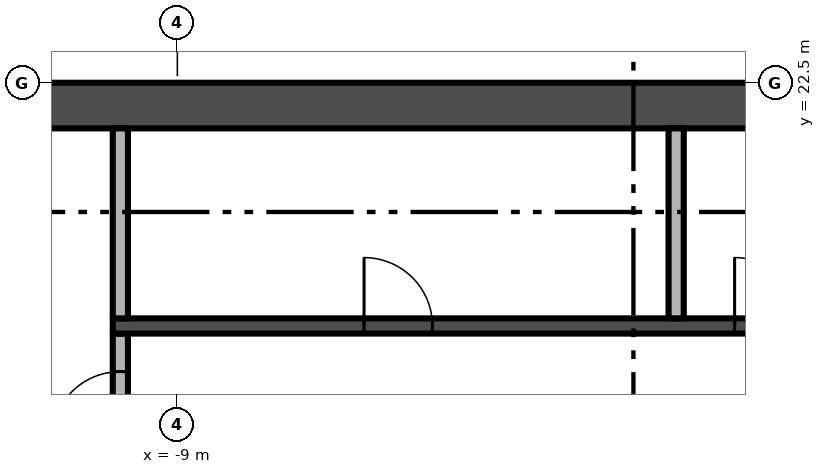
"""IFC4 building model, lengths in metres.
Left out: names, types, materials, properties, quantities, classifications, styles, units other than length and angle.
Written with IfcOpenShell. Run it as: python <this file> out.ifc"""

import sys

from ifc_helpers import new_model, si_unit, direction, frame, frame_2d, origin, place, context, subcontext, project, spatial, rectangle, extrude, element, fill, save


model = new_model("IFC4")
c1 = context("Model", 3, precision=1e-05, world=origin(), true_north=direction((0.0, 1.0)))
c2 = subcontext(c1, "Body", "Model", "MODEL_VIEW")
j1 = project(units=[si_unit("LENGTHUNIT", "METRE"), si_unit("PLANEANGLEUNIT", "RADIAN")], contexts=[c1])
p1 = place(None, origin())
s1 = spatial("IfcSite", under=j1, at=p1, CompositionType="ELEMENT")
p2 = place(p1, origin())
s2 = spatial("IfcBuilding", under=s1, at=p2, CompositionType="ELEMENT")
p3 = place(p2, frame((0.0, 0.0, 284.4)))
s3 = spatial("IfcBuildingStorey", under=s2, at=p3, CompositionType="ELEMENT", Elevation=284.4)
p4 = place(p3, frame((13.5, 22.2, -0.3), z_axis=(0.0, 0.0, 1.0), x_axis=(-1.0, 0.0, 0.0)))
e1 = element("IfcWall", 1, at=p4, inside=s3, PredefinedType="SHEAR", context=c2, shape_type="SweptSolid", body=[
    extrude(rectangle(XDim=27.0, YDim=0.6, at=frame_2d((13.5, 0.0))), origin(), (0.0, 0.0, 1.0), 5.0),
])
p5 = place(p3, frame((-9.75, 17.8, 0.0), z_axis=(0.0, 0.0, 1.0), x_axis=(0.0, 1.0, 0.0)))
e2 = element("IfcWall", 2, at=p5, inside=s3, PredefinedType="PARTITIONING", context=c2, shape_type="SweptSolid", body=[
    extrude(rectangle(XDim=1.4, YDim=0.2, at=frame_2d((0.7, 0.0))), origin(), (0.0, 0.0, 1.0), 4.7),
])
p6 = place(p5, origin())
e3 = element("IfcOpeningElement", 3, at=p6, cuts=e2, PredefinedType="OPENING", context=c2, shape_type="SweptSolid", body=[
    extrude(rectangle(XDim=0.9, YDim=2.1, at=frame_2d((0.45, 1.05))), frame((0.0, 0.11, 0.0), z_axis=(0.0, -1.0, 0.0), x_axis=(1.0, 0.0, 0.0)), (0.0, 0.0, 1.0), 0.22),
])
p7 = place(p3, frame((-9.85, 19.3, 0.0), z_axis=(0.0, 0.0, 1.0), x_axis=(1.0, 0.0, 0.0)))
e4 = element("IfcWall", 4, at=p7, inside=s3, PredefinedType="SHEAR", context=c2, shape_type="SweptSolid", body=[
    extrude(rectangle(XDim=19.7, YDim=0.2, at=frame_2d((9.85, 0.0))), origin(), (0.0, 0.0, 1.0), 4.7),
])
p8 = place(p7, frame((10.519, 0.0, 0.0)))
e5 = element("IfcOpeningElement", 5, at=p8, cuts=e4, PredefinedType="OPENING", context=c2, shape_type="SweptSolid", body=[
    extrude(rectangle(XDim=1.1, YDim=2.1, at=frame_2d((0.55, 1.05))), frame((0.0, 0.11, 0.0), z_axis=(0.0, -1.0, 0.0), x_axis=(1.0, 0.0, 0.0)), (0.0, 0.0, 1.0), 0.22),
])
p9 = place(p7, frame((12.956, 0.0, 0.0)))
e6 = element("IfcOpeningElement", 6, at=p9, cuts=e4, PredefinedType="OPENING", context=c2, shape_type="SweptSolid", body=[
    extrude(rectangle(XDim=1.1, YDim=2.1, at=frame_2d((0.55, 1.05))), frame((0.0, 0.11, 0.0), z_axis=(0.0, -1.0, 0.0), x_axis=(1.0, 0.0, 0.0)), (0.0, 0.0, 1.0), 0.22),
])
p10 = place(p7, frame((15.394, 0.0, 0.0)))
e7 = element("IfcOpeningElement", 7, at=p10, cuts=e4, PredefinedType="OPENING", context=c2, shape_type="SweptSolid", body=[
    extrude(rectangle(XDim=1.1, YDim=2.1, at=frame_2d((0.55, 1.05))), frame((0.0, 0.11, 0.0), z_axis=(0.0, -1.0, 0.0), x_axis=(1.0, 0.0, 0.0)), (0.0, 0.0, 1.0), 0.22),
])
p11 = place(p7, frame((17.831, 0.0, 0.0)))
e8 = element("IfcOpeningElement", 8, at=p11, cuts=e4, PredefinedType="OPENING", context=c2, shape_type="SweptSolid", body=[
    extrude(rectangle(XDim=1.1, YDim=2.1, at=frame_2d((0.55, 1.05))), frame((0.0, 0.11, 0.0), z_axis=(0.0, -1.0, 0.0), x_axis=(1.0, 0.0, 0.0)), (0.0, 0.0, 1.0), 0.22),
])
p12 = place(p7, frame((3.306, 0.0, 0.0)))
e9 = element("IfcOpeningElement", 9, at=p12, cuts=e4, PredefinedType="OPENING", context=c2, shape_type="SweptSolid", body=[
    extrude(rectangle(XDim=0.9, YDim=2.1, at=frame_2d((0.45, 1.05))), frame((0.0, 0.11, 0.0), z_axis=(0.0, -1.0, 0.0), x_axis=(1.0, 0.0, 0.0)), (0.0, 0.0, 1.0), 0.22),
])
p13 = place(p7, frame((8.181, 0.0, 0.0)))
e10 = element("IfcOpeningElement", 10, at=p13, cuts=e4, PredefinedType="OPENING", context=c2, shape_type="SweptSolid", body=[
    extrude(rectangle(XDim=0.9, YDim=2.1, at=frame_2d((0.45, 1.05))), frame((0.0, 0.11, 0.0), z_axis=(0.0, -1.0, 0.0), x_axis=(1.0, 0.0, 0.0)), (0.0, 0.0, 1.0), 0.22),
])
for number, where, z_axis, x_axis in (
    (11, (-9.75, 19.4, 0.0), (0.0, 0.0, 1.0), (0.0, 1.0, 0.0)),
    (12, (-2.438, 19.4, 0.0), (0.0, 0.0, 1.0), (0.0, 1.0, 0.0)),
):
    element("IfcWall", number, at=place(p3, frame(where, z_axis=z_axis, x_axis=x_axis)), inside=s3, PredefinedType="PARTITIONING", context=c2, shape_type="SweptSolid", body=[
        extrude(rectangle(XDim=2.5, YDim=0.2, at=frame_2d((1.25, 0.0))), origin(), (0.0, 0.0, 1.0), 4.7),
    ])
p14 = place(p6, origin())
e13 = element("IfcDoor", 13, at=p14, inside=s3, OperationType="SINGLE_SWING_LEFT", PredefinedType="DOOR", context=c2, shape_type="SweptSolid", body=[
    extrude(rectangle(XDim=0.9, YDim=2.1, at=frame_2d((0.45, 1.05))), frame((0.0, 0.025, 0.0), z_axis=(0.0, -1.0, 0.0), x_axis=(1.0, 0.0, 0.0)), (0.0, 0.0, 1.0), 0.05),
])
fill(e3, e13)
p15 = place(p12, origin())
e14 = element("IfcDoor", 14, at=p15, inside=s3, OperationType="SINGLE_SWING_LEFT", PredefinedType="DOOR", context=c2, shape_type="SweptSolid", body=[
    extrude(rectangle(XDim=0.9, YDim=2.1, at=frame_2d((0.45, 1.05))), frame((0.0, 0.025, 0.0), z_axis=(0.0, -1.0, 0.0), x_axis=(1.0, 0.0, 0.0)), (0.0, 0.0, 1.0), 0.05),
])
fill(e9, e14)
p16 = place(p13, origin())
e15 = element("IfcDoor", 15, at=p16, inside=s3, OperationType="SINGLE_SWING_LEFT", PredefinedType="DOOR", context=c2, shape_type="SweptSolid", body=[
    extrude(rectangle(XDim=0.9, YDim=2.1, at=frame_2d((0.45, 1.05))), frame((0.0, 0.025, 0.0), z_axis=(0.0, -1.0, 0.0), x_axis=(1.0, 0.0, 0.0)), (0.0, 0.0, 1.0), 0.05),
])
fill(e10, e15)
save(model, sys.argv[1])
